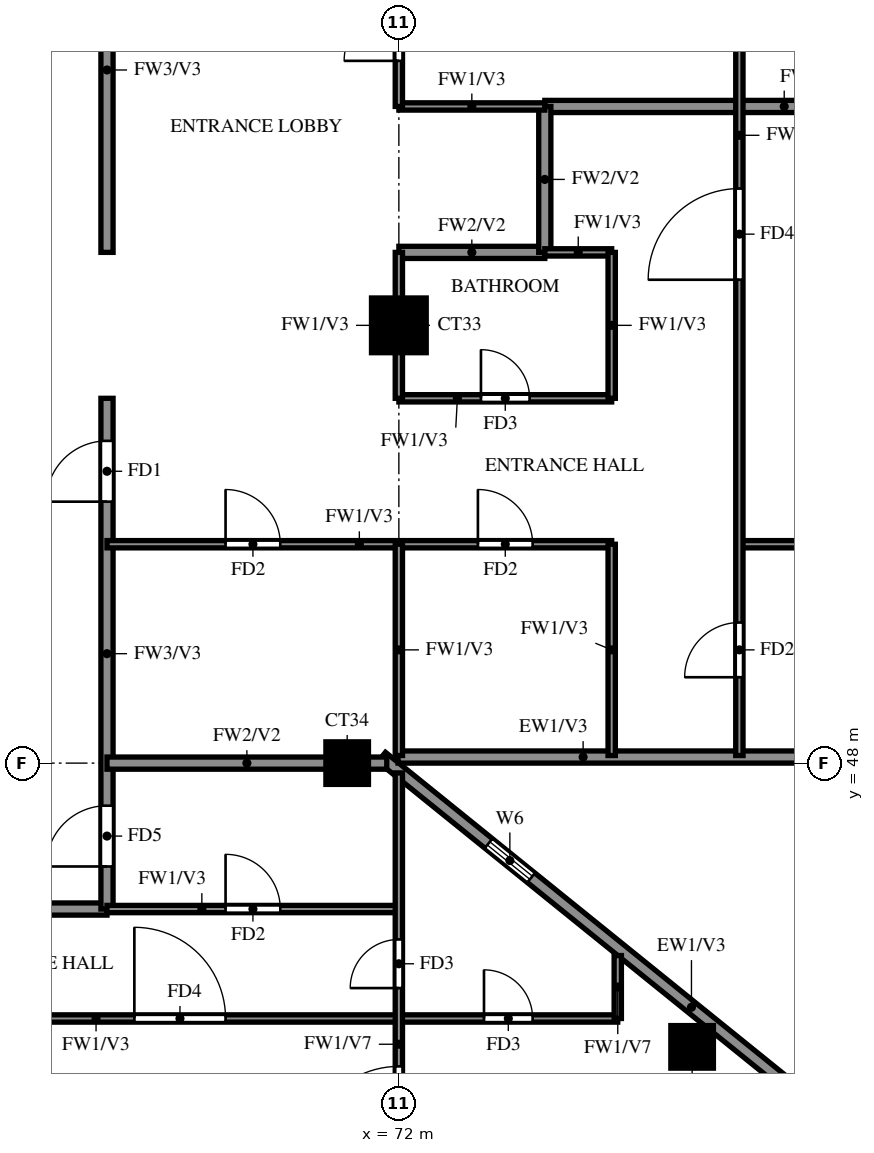
"""IFC4 building model, lengths in metres.
Left out: names, types, materials, properties, quantities, classifications, styles, units other than length and angle.
Written with IfcOpenShell. Run it as: python <this file> out.ifc"""

import sys

from ifc_helpers import new_model, si_unit, direction, frame, frame_2d, origin, origin_2d, place, context, subcontext, project, spatial, rectangle, extrude, source, transform, mapped, element, fill, save


model = new_model("IFC4")
c1 = context("Model", 3, precision=1e-05, world=origin(), true_north=direction((0.0, 1.0)))
c2 = subcontext(c1, "Body", "Model", "MODEL_VIEW")
j1 = project(units=[si_unit("LENGTHUNIT", "METRE"), si_unit("PLANEANGLEUNIT", "RADIAN")], contexts=[c1])
p1 = place(None, origin())
s1 = spatial("IfcSite", under=j1, at=p1, CompositionType="ELEMENT")
p2 = place(p1, origin())
s2 = spatial("IfcBuilding", under=s1, at=p2, CompositionType="ELEMENT")
p3 = place(p2, frame((0.0, 0.0, 215.0)))
s3 = spatial("IfcBuildingStorey", under=s2, at=p3, CompositionType="ELEMENT", Elevation=215.0)
m1 = source(origin(), c2, "Body", "SweptSolid", [
    extrude(rectangle(XDim=0.7, YDim=0.7, at=origin_2d()), origin(), (0.0, 0.0, 1.0), 3.22),
])
for number, where, z_axis, x_axis in (
    (1, (76.823, 43.333, 0.0), (0.0, 0.0, 1.0), (1.0, 0.0, 0.0)),
    (2, (71.15, 48.0, 0.0), (0.0, 0.0, 1.0), (1.0, 0.0, 0.0)),
):
    element("IfcColumn", number, at=place(p3, frame(where, z_axis=z_axis, x_axis=x_axis)), inside=s3, PredefinedType="COLUMN", context=c2, shape_type="MappedRepresentation", body=[
        mapped(m1, transform((0.0, 0.0, 0.0))),
    ])
m2 = source(origin(), c2, "Body", "SweptSolid", [
    extrude(rectangle(XDim=0.9, YDim=0.9, at=origin_2d()), origin(), (0.0, 0.0, 1.0), 3.22),
])
p4 = place(p3, frame((72.0, 55.2, 0.0), z_axis=(0.0, 0.0, 1.0), x_axis=(1.0, 0.0, 0.0)))
e3 = element("IfcColumn", 3, at=p4, inside=s3, PredefinedType="COLUMN", context=c2, shape_type="MappedRepresentation", body=[
    mapped(m2, transform((0.0, 0.0, 0.0))),
])
p5 = place(p3, frame((81.907, 39.87, 0.0), z_axis=(0.0, 0.0, 1.0), x_axis=(-0.777936274417, 0.62834318087, 0.0)))
e4 = element("IfcWall", 4, at=p5, inside=s3, PredefinedType="SOLIDWALL", context=c2, shape_type="SweptSolid", body=[
    extrude(rectangle(XDim=13.099, YDim=0.2, at=frame_2d((6.549, 0.0))), origin(), (0.0, 0.0, 1.0), 3.22),
])
p6 = place(p5, frame((9.938, 0.0, 1.5)))
e5 = element("IfcOpeningElement", 5, at=p6, cuts=e4, PredefinedType="OPENING", context=c2, shape_type="SweptSolid", body=[
    extrude(rectangle(XDim=0.9, YDim=0.9, at=frame_2d((0.45, 0.45))), frame((0.0, 0.11, 0.0), z_axis=(0.0, -1.0, 0.0), x_axis=(1.0, 0.0, 0.0)), (0.0, 0.0, 1.0), 0.22),
])
p7 = place(p3, frame((71.987, 48.1, 0.0), z_axis=(0.0, 0.0, 1.0), x_axis=(1.0, 0.0, 0.0)))
e6 = element("IfcWall", 6, at=p7, inside=s3, PredefinedType="SOLIDWALL", context=c2, shape_type="SweptSolid", body=[
    extrude(rectangle(XDim=6.763, YDim=0.2, at=frame_2d((3.381, 0.0))), origin(), (0.0, 0.0, 1.0), 3.22),
])
p8 = place(p3, frame((60.0, 45.6, 0.0), z_axis=(0.0, 0.0, 1.0), x_axis=(1.0, 0.0, 0.0)))
e7 = element("IfcWall", 7, at=p8, inside=s3, PredefinedType="SOLIDWALL", context=c2, shape_type="SweptSolid", body=[
    extrude(rectangle(XDim=7.2, YDim=0.2, at=frame_2d((3.6, 0.0))), origin(), (0.0, 0.0, 1.0), 3.22),
])
p9 = place(p3, frame((67.2, 45.6, 0.0), z_axis=(0.0, 0.0, 1.0), x_axis=(0.0, 1.0, 0.0)))
e8 = element("IfcWall", 8, at=p9, inside=s3, PredefinedType="SOLIDWALL", context=c2, shape_type="SweptSolid", body=[
    extrude(rectangle(XDim=8.4, YDim=0.2, at=frame_2d((4.2, 0.0))), origin(), (0.0, 0.0, 1.0), 3.22),
])
p10 = place(p9, frame((6.7, 0.0, 0.0)))
e9 = element("IfcOpeningElement", 9, at=p10, cuts=e8, PredefinedType="OPENING", context=c2, shape_type="SweptSolid", body=[
    extrude(rectangle(XDim=1.0, YDim=2.1, at=frame_2d((0.5, 1.05))), frame((0.0, 0.11, 0.0), z_axis=(0.0, -1.0, 0.0), x_axis=(1.0, 0.0, 0.0)), (0.0, 0.0, 1.0), 0.22),
])
p11 = place(p9, frame((0.7, 0.0, 0.0)))
e10 = element("IfcOpeningElement", 10, at=p11, cuts=e8, PredefinedType="OPENING", context=c2, shape_type="SweptSolid", body=[
    extrude(rectangle(XDim=1.0, YDim=2.1, at=frame_2d((0.5, 1.05))), frame((0.0, 0.11, 0.0), z_axis=(0.0, -1.0, 0.0), x_axis=(1.0, 0.0, 0.0)), (0.0, 0.0, 1.0), 0.22),
])
p12 = place(p3, frame((67.2, 56.4, 0.0), z_axis=(0.0, 0.0, 1.0), x_axis=(0.0, 1.0, 0.0)))
e11 = element("IfcWall", 11, at=p12, inside=s3, PredefinedType="SOLIDWALL", context=c2, shape_type="SweptSolid", body=[
    extrude(rectangle(XDim=6.0, YDim=0.2, at=frame_2d((3.0, 0.0))), origin(), (0.0, 0.0, 1.0), 3.22),
])
p13 = place(p12, frame((3.7, 0.0, 0.0)))
e12 = element("IfcOpeningElement", 12, at=p13, cuts=e11, PredefinedType="OPENING", context=c2, shape_type="SweptSolid", body=[
    extrude(rectangle(XDim=1.0, YDim=2.1, at=frame_2d((0.5, 1.05))), frame((0.0, 0.11, 0.0), z_axis=(0.0, -1.0, 0.0), x_axis=(1.0, 0.0, 0.0)), (0.0, 0.0, 1.0), 0.22),
])
p14 = place(p3, frame((67.2, 48.0, 0.0), z_axis=(0.0, 0.0, 1.0), x_axis=(1.0, 0.0, 0.0)))
e13 = element("IfcWall", 13, at=p14, inside=s3, PredefinedType="SOLIDWALL", context=c2, shape_type="SweptSolid", body=[
    extrude(rectangle(XDim=4.601, YDim=0.2, at=frame_2d((2.301, 0.0))), origin(), (0.0, 0.0, 1.0), 3.22),
])
p15 = place(p3, frame((72.0, 56.4, 0.0), z_axis=(0.0, 0.0, 1.0), x_axis=(1.0, 0.0, 0.0)))
e14 = element("IfcWall", 14, at=p15, inside=s3, PredefinedType="SOLIDWALL", context=c2, shape_type="SweptSolid", body=[
    extrude(rectangle(XDim=2.4, YDim=0.2, at=frame_2d((1.2, 0.0))), origin(), (0.0, 0.0, 1.0), 3.22),
])
p16 = place(p3, frame((74.4, 58.8, 0.0), z_axis=(0.0, 0.0, 1.0), x_axis=(1.0, 0.0, 0.0)))
e15 = element("IfcWall", 15, at=p16, inside=s3, PredefinedType="SOLIDWALL", context=c2, shape_type="SweptSolid", body=[
    extrude(rectangle(XDim=7.875, YDim=0.2, at=frame_2d((3.938, 0.0))), origin(), (0.0, 0.0, 1.0), 2.32),
])
p17 = place(p3, frame((74.4, 56.4, 0.0), z_axis=(0.0, 0.0, 1.0), x_axis=(0.0, 1.0, 0.0)))
e16 = element("IfcWall", 16, at=p17, inside=s3, PredefinedType="SOLIDWALL", context=c2, shape_type="SweptSolid", body=[
    extrude(rectangle(XDim=2.4, YDim=0.2, at=frame_2d((1.2, 0.0))), origin(), (0.0, 0.0, 1.0), 3.22),
])
p18 = place(p3, frame((60.0, 43.8, 0.0), z_axis=(0.0, 0.0, 1.0), x_axis=(1.0, 0.0, 0.0)))
e17 = element("IfcWall", 17, at=p18, inside=s3, PredefinedType="PARTITIONING", context=c2, shape_type="SweptSolid", body=[
    extrude(rectangle(XDim=15.6, YDim=0.12, at=frame_2d((7.8, 0.0))), origin(), (0.0, 0.0, 1.0), 3.22),
])
p19 = place(p18, frame((7.65, 0.0, 0.0)))
e18 = element("IfcOpeningElement", 18, at=p19, cuts=e17, PredefinedType="OPENING", context=c2, shape_type="SweptSolid", body=[
    extrude(rectangle(XDim=1.5, YDim=2.1, at=frame_2d((0.75, 1.05))), frame((0.0, 0.07, 0.0), z_axis=(0.0, -1.0, 0.0), x_axis=(1.0, 0.0, 0.0)), (0.0, 0.0, 1.0), 0.14),
])
p20 = place(p18, frame((1.95, 0.0, 0.0)))
e19 = element("IfcOpeningElement", 19, at=p20, cuts=e17, PredefinedType="OPENING", context=c2, shape_type="SweptSolid", body=[
    extrude(rectangle(XDim=0.9, YDim=2.1, at=frame_2d((0.45, 1.05))), frame((0.0, 0.07, 0.0), z_axis=(0.0, -1.0, 0.0), x_axis=(1.0, 0.0, 0.0)), (0.0, 0.0, 1.0), 0.14),
])
p21 = place(p18, frame((13.4, 0.0, 0.0)))
e20 = element("IfcOpeningElement", 20, at=p21, cuts=e17, PredefinedType="OPENING", context=c2, shape_type="SweptSolid", body=[
    extrude(rectangle(XDim=0.8, YDim=2.1, at=frame_2d((0.4, 1.05))), frame((0.0, 0.07, 0.0), z_axis=(0.0, -1.0, 0.0), x_axis=(1.0, 0.0, 0.0)), (0.0, 0.0, 1.0), 0.14),
])
p22 = place(p3, frame((67.2, 45.6, 0.0), z_axis=(0.0, 0.0, 1.0), x_axis=(1.0, 0.0, 0.0)))
e21 = element("IfcWall", 21, at=p22, inside=s3, PredefinedType="PARTITIONING", context=c2, shape_type="SweptSolid", body=[
    extrude(rectangle(XDim=4.8, YDim=0.12, at=frame_2d((2.4, 0.0))), origin(), (0.0, 0.0, 1.0), 3.22),
])
p23 = place(p22, frame((1.95, 0.0, 0.0)))
e22 = element("IfcOpeningElement", 22, at=p23, cuts=e21, PredefinedType="OPENING", context=c2, shape_type="SweptSolid", body=[
    extrude(rectangle(XDim=0.9, YDim=2.1, at=frame_2d((0.45, 1.05))), frame((0.0, 0.07, 0.0), z_axis=(0.0, -1.0, 0.0), x_axis=(1.0, 0.0, 0.0)), (0.0, 0.0, 1.0), 0.14),
])
p24 = place(p3, frame((67.2, 51.6, 0.0), z_axis=(0.0, 0.0, 1.0), x_axis=(1.0, 0.0, 0.0)))
e23 = element("IfcWall", 23, at=p24, inside=s3, PredefinedType="PARTITIONING", context=c2, shape_type="SweptSolid", body=[
    extrude(rectangle(XDim=8.3, YDim=0.12, at=frame_2d((4.15, 0.0))), origin(), (0.0, 0.0, 1.0), 3.22),
])
p25 = place(p24, frame((6.1, 0.0, 0.0)))
e24 = element("IfcOpeningElement", 24, at=p25, cuts=e23, PredefinedType="OPENING", context=c2, shape_type="SweptSolid", body=[
    extrude(rectangle(XDim=0.9, YDim=2.1, at=frame_2d((0.45, 1.05))), frame((0.0, 0.07, 0.0), z_axis=(0.0, -1.0, 0.0), x_axis=(1.0, 0.0, 0.0)), (0.0, 0.0, 1.0), 0.14),
])
p26 = place(p24, frame((1.95, 0.0, 0.0)))
e25 = element("IfcOpeningElement", 25, at=p26, cuts=e23, PredefinedType="OPENING", context=c2, shape_type="SweptSolid", body=[
    extrude(rectangle(XDim=0.9, YDim=2.1, at=frame_2d((0.45, 1.05))), frame((0.0, 0.07, 0.0), z_axis=(0.0, -1.0, 0.0), x_axis=(1.0, 0.0, 0.0)), (0.0, 0.0, 1.0), 0.14),
])
p27 = place(p3, frame((77.6, 51.6, 0.0), z_axis=(0.0, 0.0, 1.0), x_axis=(1.0, 0.0, 0.0)))
e26 = element("IfcWall", 26, at=p27, inside=s3, PredefinedType="PARTITIONING", context=c2, shape_type="SweptSolid", body=[
    extrude(rectangle(XDim=4.675, YDim=0.12, at=frame_2d((2.337, 0.0))), origin(), (0.0, 0.0, 1.0), 2.32),
])
p28 = place(p3, frame((72.0, 54.0, 0.0), z_axis=(0.0, 0.0, 1.0), x_axis=(1.0, 0.0, 0.0)))
e27 = element("IfcWall", 27, at=p28, inside=s3, PredefinedType="PARTITIONING", context=c2, shape_type="SweptSolid", body=[
    extrude(rectangle(XDim=3.5, YDim=0.12, at=frame_2d((1.75, 0.0))), origin(), (0.0, 0.0, 1.0), 3.22),
])
p29 = place(p28, frame((1.35, 0.0, 0.0)))
e28 = element("IfcOpeningElement", 28, at=p29, cuts=e27, PredefinedType="OPENING", context=c2, shape_type="SweptSolid", body=[
    extrude(rectangle(XDim=0.8, YDim=2.1, at=frame_2d((0.4, 1.05))), frame((0.0, 0.07, 0.0), z_axis=(0.0, -1.0, 0.0), x_axis=(1.0, 0.0, 0.0)), (0.0, 0.0, 1.0), 0.14),
])
p30 = place(p3, frame((74.4, 56.4, 0.0), z_axis=(0.0, 0.0, 1.0), x_axis=(1.0, 0.0, 0.0)))
e29 = element("IfcWall", 29, at=p30, inside=s3, PredefinedType="PARTITIONING", context=c2, shape_type="SweptSolid", body=[
    extrude(rectangle(XDim=1.1, YDim=0.12, at=frame_2d((0.55, 0.0))), origin(), (0.0, 0.0, 1.0), 3.22),
])
p31 = place(p3, frame((72.0, 58.8, 0.0), z_axis=(0.0, 0.0, 1.0), x_axis=(1.0, 0.0, 0.0)))
e30 = element("IfcWall", 30, at=p31, inside=s3, PredefinedType="PARTITIONING", context=c2, shape_type="SweptSolid", body=[
    extrude(rectangle(XDim=2.4, YDim=0.12, at=frame_2d((1.2, 0.0))), origin(), (0.0, 0.0, 1.0), 3.22),
])
p32 = place(p3, frame((72.0, 39.725, 0.0), z_axis=(0.0, 0.0, 1.0), x_axis=(0.0, 1.0, 0.0)))
e31 = element("IfcWall", 31, at=p32, inside=s3, PredefinedType="PARTITIONING", context=c2, shape_type="SweptSolid", body=[
    extrude(rectangle(XDim=8.114, YDim=0.12, at=frame_2d((4.057, 0.0))), origin(), (0.0, 0.0, 1.0), 2.32),
])
p33 = place(p32, frame((1.788, 0.0, 0.0)))
e32 = element("IfcOpeningElement", 32, at=p33, cuts=e31, PredefinedType="OPENING", context=c2, shape_type="SweptSolid", body=[
    extrude(rectangle(XDim=1.5, YDim=2.1, at=frame_2d((0.75, 1.05))), frame((0.0, 0.07, 0.0), z_axis=(0.0, -1.0, 0.0), x_axis=(1.0, 0.0, 0.0)), (0.0, 0.0, 1.0), 0.14),
])
p34 = place(p32, frame((4.575, 0.0, 0.0)))
e33 = element("IfcOpeningElement", 33, at=p34, cuts=e31, PredefinedType="OPENING", context=c2, shape_type="SweptSolid", body=[
    extrude(rectangle(XDim=0.8, YDim=2.1, at=frame_2d((0.4, 1.05))), frame((0.0, 0.07, 0.0), z_axis=(0.0, -1.0, 0.0), x_axis=(1.0, 0.0, 0.0)), (0.0, 0.0, 1.0), 0.14),
])
p35 = place(p3, frame((72.0, 48.125, 0.0), z_axis=(0.0, 0.0, 1.0), x_axis=(0.0, 1.0, 0.0)))
e34 = element("IfcWall", 34, at=p35, inside=s3, PredefinedType="PARTITIONING", context=c2, shape_type="SweptSolid", body=[
    extrude(rectangle(XDim=3.475, YDim=0.12, at=frame_2d((1.738, 0.0))), origin(), (0.0, 0.0, 1.0), 3.22),
])
p36 = place(p3, frame((72.0, 54.0, 0.0), z_axis=(0.0, 0.0, 1.0), x_axis=(0.0, 1.0, 0.0)))
e35 = element("IfcWall", 35, at=p36, inside=s3, PredefinedType="PARTITIONING", context=c2, shape_type="SweptSolid", body=[
    extrude(rectangle(XDim=2.4, YDim=0.12, at=frame_2d((1.2, 0.0))), origin(), (0.0, 0.0, 1.0), 3.22),
])
p37 = place(p3, frame((72.0, 58.8, 0.0), z_axis=(0.0, 0.0, 1.0), x_axis=(0.0, 1.0, 0.0)))
e36 = element("IfcWall", 36, at=p37, inside=s3, PredefinedType="PARTITIONING", context=c2, shape_type="SweptSolid", body=[
    extrude(rectangle(XDim=3.6, YDim=0.12, at=frame_2d((1.8, 0.0))), origin(), (0.0, 0.0, 1.0), 3.22),
])
p38 = place(p37, frame((0.75, 0.0, 0.0)))
e37 = element("IfcOpeningElement", 37, at=p38, cuts=e36, PredefinedType="OPENING", context=c2, shape_type="SweptSolid", body=[
    extrude(rectangle(XDim=0.9, YDim=2.1, at=frame_2d((0.45, 1.05))), frame((0.0, 0.07, 0.0), z_axis=(0.0, -1.0, 0.0), x_axis=(1.0, 0.0, 0.0)), (0.0, 0.0, 1.0), 0.14),
])
p39 = place(p3, frame((75.5, 48.125, 0.0), z_axis=(0.0, 0.0, 1.0), x_axis=(0.0, 1.0, 0.0)))
e38 = element("IfcWall", 38, at=p39, inside=s3, PredefinedType="PARTITIONING", context=c2, shape_type="SweptSolid", body=[
    extrude(rectangle(XDim=3.475, YDim=0.12, at=frame_2d((1.738, 0.0))), origin(), (0.0, 0.0, 1.0), 3.22),
])
p40 = place(p3, frame((75.5, 54.0, 0.0), z_axis=(0.0, 0.0, 1.0), x_axis=(0.0, 1.0, 0.0)))
e39 = element("IfcWall", 39, at=p40, inside=s3, PredefinedType="PARTITIONING", context=c2, shape_type="SweptSolid", body=[
    extrude(rectangle(XDim=2.4, YDim=0.12, at=frame_2d((1.2, 0.0))), origin(), (0.0, 0.0, 1.0), 3.22),
])
p41 = place(p3, frame((75.6, 43.8, 0.0), z_axis=(0.0, 0.0, 1.0), x_axis=(0.0, 1.0, 0.0)))
e40 = element("IfcWall", 40, at=p41, inside=s3, PredefinedType="PARTITIONING", context=c2, shape_type="SweptSolid", body=[
    extrude(rectangle(XDim=1.035, YDim=0.12, at=frame_2d((0.518, 0.0))), origin(), (0.0, 0.0, 1.0), 2.32),
])
p42 = place(p3, frame((77.6, 48.125, 0.0), z_axis=(0.0, 0.0, 1.0), x_axis=(0.0, 1.0, 0.0)))
e41 = element("IfcWall", 41, at=p42, inside=s3, PredefinedType="PARTITIONING", context=c2, shape_type="SweptSolid", body=[
    extrude(rectangle(XDim=21.475, YDim=0.12, at=frame_2d((10.738, 0.0))), origin(), (0.0, 0.0, 1.0), 3.22),
])
p43 = place(p42, frame((1.288, 0.0, 0.0)))
e42 = element("IfcOpeningElement", 42, at=p43, cuts=e41, PredefinedType="OPENING", context=c2, shape_type="SweptSolid", body=[
    extrude(rectangle(XDim=0.9, YDim=2.1, at=frame_2d((0.45, 1.05))), frame((0.0, 0.07, 0.0), z_axis=(0.0, -1.0, 0.0), x_axis=(1.0, 0.0, 0.0)), (0.0, 0.0, 1.0), 0.14),
])
p44 = place(p42, frame((7.825, 0.0, 0.0)))
e43 = element("IfcOpeningElement", 43, at=p44, cuts=e41, PredefinedType="OPENING", context=c2, shape_type="SweptSolid", body=[
    extrude(rectangle(XDim=1.5, YDim=2.1, at=frame_2d((0.75, 1.05))), frame((0.0, 0.07, 0.0), z_axis=(0.0, -1.0, 0.0), x_axis=(1.0, 0.0, 0.0)), (0.0, 0.0, 1.0), 0.14),
])
p45 = place(p42, frame((12.025, 0.0, 0.0)))
e44 = element("IfcOpeningElement", 44, at=p45, cuts=e41, PredefinedType="OPENING", context=c2, shape_type="SweptSolid", body=[
    extrude(rectangle(XDim=0.9, YDim=2.1, at=frame_2d((0.45, 1.05))), frame((0.0, 0.07, 0.0), z_axis=(0.0, -1.0, 0.0), x_axis=(1.0, 0.0, 0.0)), (0.0, 0.0, 1.0), 0.14),
])
p46 = place(p42, frame((17.425, 0.0, 0.0)))
e45 = element("IfcOpeningElement", 45, at=p46, cuts=e41, PredefinedType="OPENING", context=c2, shape_type="SweptSolid", body=[
    extrude(rectangle(XDim=0.9, YDim=2.1, at=frame_2d((0.45, 1.05))), frame((0.0, 0.07, 0.0), z_axis=(0.0, -1.0, 0.0), x_axis=(1.0, 0.0, 0.0)), (0.0, 0.0, 1.0), 0.14),
])
p47 = place(p6, origin())
e46 = element("IfcWindow", 46, at=p47, inside=s3, PartitioningType="SINGLE_PANEL", PredefinedType="WINDOW", context=c2, shape_type="SweptSolid", body=[
    extrude(rectangle(XDim=0.9, YDim=0.9, at=frame_2d((0.45, 0.45))), frame((0.0, 0.03, 0.0), z_axis=(0.0, -1.0, 0.0), x_axis=(1.0, 0.0, 0.0)), (0.0, 0.0, 1.0), 0.06),
])
fill(e5, e46)
p48 = place(p10, origin())
e47 = element("IfcDoor", 47, at=p48, inside=s3, OperationType="SINGLE_SWING_LEFT", PredefinedType="DOOR", context=c2, shape_type="SweptSolid", body=[
    extrude(rectangle(XDim=1.0, YDim=2.1, at=frame_2d((0.5, 1.05))), frame((0.0, 0.025, 0.0), z_axis=(0.0, -1.0, 0.0), x_axis=(1.0, 0.0, 0.0)), (0.0, 0.0, 1.0), 0.05),
])
fill(e9, e47)
p49 = place(p43, origin())
e48 = element("IfcDoor", 48, at=p49, inside=s3, OperationType="SINGLE_SWING_LEFT", PredefinedType="DOOR", context=c2, shape_type="SweptSolid", body=[
    extrude(rectangle(XDim=0.9, YDim=2.1, at=frame_2d((0.45, 1.05))), frame((0.0, 0.025, 0.0), z_axis=(0.0, -1.0, 0.0), x_axis=(1.0, 0.0, 0.0)), (0.0, 0.0, 1.0), 0.05),
])
fill(e42, e48)
p50 = place(p44, origin())
e49 = element("IfcDoor", 49, at=p50, inside=s3, OperationType="SINGLE_SWING_LEFT", PredefinedType="DOOR", context=c2, shape_type="SweptSolid", body=[
    extrude(rectangle(XDim=1.5, YDim=2.1, at=frame_2d((0.75, 1.05))), frame((0.0, 0.025, 0.0), z_axis=(0.0, -1.0, 0.0), x_axis=(1.0, 0.0, 0.0)), (0.0, 0.0, 1.0), 0.05),
])
fill(e43, e49)
p51 = place(p25, origin())
e50 = element("IfcDoor", 50, at=p51, inside=s3, OperationType="SINGLE_SWING_LEFT", PredefinedType="DOOR", context=c2, shape_type="SweptSolid", body=[
    extrude(rectangle(XDim=0.9, YDim=2.1, at=frame_2d((0.45, 1.05))), frame((0.0, 0.025, 0.0), z_axis=(0.0, -1.0, 0.0), x_axis=(1.0, 0.0, 0.0)), (0.0, 0.0, 1.0), 0.05),
])
fill(e24, e50)
p52 = place(p29, origin())
e51 = element("IfcDoor", 51, at=p52, inside=s3, OperationType="SINGLE_SWING_LEFT", PredefinedType="DOOR", context=c2, shape_type="SweptSolid", body=[
    extrude(rectangle(XDim=0.8, YDim=2.1, at=frame_2d((0.4, 1.05))), frame((0.0, 0.025, 0.0), z_axis=(0.0, -1.0, 0.0), x_axis=(1.0, 0.0, 0.0)), (0.0, 0.0, 1.0), 0.05),
])
fill(e28, e51)
p53 = place(p26, origin())
e52 = element("IfcDoor", 52, at=p53, inside=s3, OperationType="SINGLE_SWING_RIGHT", PredefinedType="DOOR", context=c2, shape_type="SweptSolid", body=[
    extrude(rectangle(XDim=0.9, YDim=2.1, at=frame_2d((0.45, 1.05))), frame((0.0, 0.025, 0.0), z_axis=(0.0, -1.0, 0.0), x_axis=(1.0, 0.0, 0.0)), (0.0, 0.0, 1.0), 0.05),
])
fill(e25, e52)
p54 = place(p38, origin())
e53 = element("IfcDoor", 53, at=p54, inside=s3, OperationType="SINGLE_SWING_LEFT", PredefinedType="DOOR", context=c2, shape_type="SweptSolid", body=[
    extrude(rectangle(XDim=0.9, YDim=2.1, at=frame_2d((0.45, 1.05))), frame((0.0, 0.025, 0.0), z_axis=(0.0, -1.0, 0.0), x_axis=(1.0, 0.0, 0.0)), (0.0, 0.0, 1.0), 0.05),
])
fill(e37, e53)
p55 = place(p23, origin())
e54 = element("IfcDoor", 54, at=p55, inside=s3, OperationType="SINGLE_SWING_LEFT", PredefinedType="DOOR", context=c2, shape_type="SweptSolid", body=[
    extrude(rectangle(XDim=0.9, YDim=2.1, at=frame_2d((0.45, 1.05))), frame((0.0, 0.025, 0.0), z_axis=(0.0, -1.0, 0.0), x_axis=(1.0, 0.0, 0.0)), (0.0, 0.0, 1.0), 0.05),
])
fill(e22, e54)
p56 = place(p11, origin())
e55 = element("IfcDoor", 55, at=p56, inside=s3, OperationType="SINGLE_SWING_LEFT", PredefinedType="DOOR", context=c2, shape_type="SweptSolid", body=[
    extrude(rectangle(XDim=1.0, YDim=2.1, at=frame_2d((0.5, 1.05))), frame((0.0, 0.025, 0.0), z_axis=(0.0, -1.0, 0.0), x_axis=(1.0, 0.0, 0.0)), (0.0, 0.0, 1.0), 0.05),
])
fill(e10, e55)
p57 = place(p19, origin())
e56 = element("IfcDoor", 56, at=p57, inside=s3, OperationType="SINGLE_SWING_RIGHT", PredefinedType="DOOR", context=c2, shape_type="SweptSolid", body=[
    extrude(rectangle(XDim=1.5, YDim=2.1, at=frame_2d((0.75, 1.05))), frame((0.0, 0.025, 0.0), z_axis=(0.0, -1.0, 0.0), x_axis=(1.0, 0.0, 0.0)), (0.0, 0.0, 1.0), 0.05),
])
fill(e18, e56)
p58 = place(p33, origin())
e57 = element("IfcDoor", 57, at=p58, inside=s3, OperationType="SINGLE_SWING_RIGHT", PredefinedType="DOOR", context=c2, shape_type="SweptSolid", body=[
    extrude(rectangle(XDim=1.5, YDim=2.1, at=frame_2d((0.75, 1.05))), frame((0.0, 0.025, 0.0), z_axis=(0.0, -1.0, 0.0), x_axis=(1.0, 0.0, 0.0)), (0.0, 0.0, 1.0), 0.05),
])
fill(e32, e57)
p59 = place(p34, origin())
e58 = element("IfcDoor", 58, at=p59, inside=s3, OperationType="SINGLE_SWING_RIGHT", PredefinedType="DOOR", context=c2, shape_type="SweptSolid", body=[
    extrude(rectangle(XDim=0.8, YDim=2.1, at=frame_2d((0.4, 1.05))), frame((0.0, 0.025, 0.0), z_axis=(0.0, -1.0, 0.0), x_axis=(1.0, 0.0, 0.0)), (0.0, 0.0, 1.0), 0.05),
])
fill(e33, e58)
p60 = place(p21, origin())
e59 = element("IfcDoor", 59, at=p60, inside=s3, OperationType="SINGLE_SWING_LEFT", PredefinedType="DOOR", context=c2, shape_type="SweptSolid", body=[
    extrude(rectangle(XDim=0.8, YDim=2.1, at=frame_2d((0.4, 1.05))), frame((0.0, 0.025, 0.0), z_axis=(0.0, -1.0, 0.0), x_axis=(1.0, 0.0, 0.0)), (0.0, 0.0, 1.0), 0.05),
])
fill(e20, e59)
save(model, sys.argv[1])
